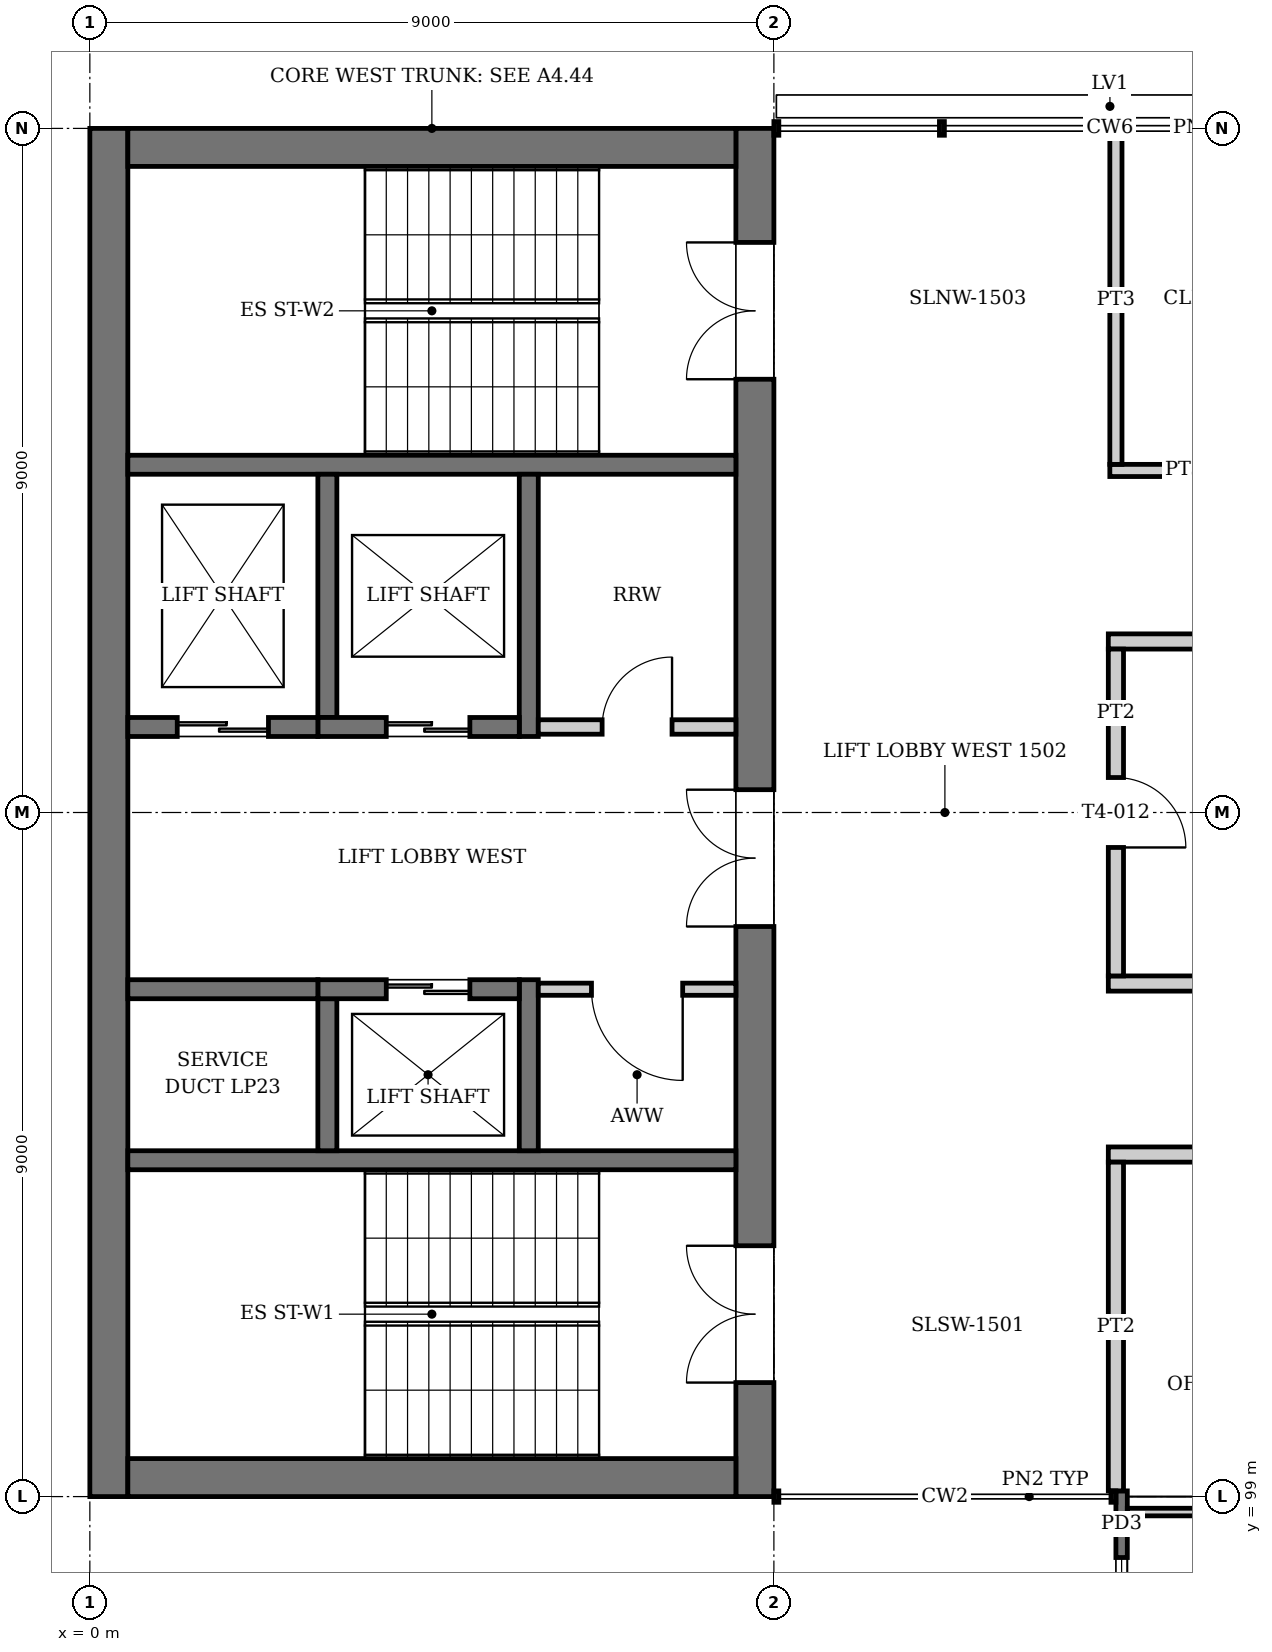
"""IFC4 building model, lengths in metres.
Left out: names, types, materials, properties, quantities, classifications, styles, units other than length and angle.
Written with IfcOpenShell. Run it as: python <this file> out.ifc"""

import sys

from ifc_helpers import new_model, si_unit, direction, frame, frame_2d, origin, place, context, subcontext, project, spatial, rectangle, extrude, element, fill, save


model = new_model("IFC4")
c1 = context("Model", 3, precision=1e-05, world=origin(), true_north=direction((0.0, 1.0)))
c2 = subcontext(c1, "Body", "Model", "MODEL_VIEW")
j1 = project(units=[si_unit("LENGTHUNIT", "METRE"), si_unit("PLANEANGLEUNIT", "RADIAN")], contexts=[c1])
p1 = place(None, origin())
s1 = spatial("IfcSite", under=j1, at=p1, CompositionType="ELEMENT")
p2 = place(p1, origin())
s2 = spatial("IfcBuilding", under=s1, at=p2, CompositionType="ELEMENT")
p3 = place(p2, frame((0.0, 0.0, 63.2)))
s3 = spatial("IfcBuildingStorey", under=s2, at=p3, CompositionType="ELEMENT", Elevation=63.2)
p4 = place(p3, frame((0.25, 99.0, 0.0), z_axis=(0.0, 0.0, 1.0), x_axis=(0.0, 1.0, 0.0)))
e1 = element("IfcWall", 1, at=p4, inside=s3, PredefinedType="SHEAR", context=c2, shape_type="SweptSolid", body=[
    extrude(rectangle(XDim=18.0, YDim=0.5, at=frame_2d((9.0, 0.0))), origin(), (0.0, 0.0, 1.0), 4.0),
])
p5 = place(p3, frame((8.75, 99.0, 0.0), z_axis=(0.0, 0.0, 1.0), x_axis=(0.0, 1.0, 0.0)))
e2 = element("IfcWall", 2, at=p5, inside=s3, PredefinedType="SHEAR", context=c2, shape_type="SweptSolid", body=[
    extrude(rectangle(XDim=18.0, YDim=0.5, at=frame_2d((9.0, 0.0))), origin(), (0.0, 0.0, 1.0), 4.0),
])
p6 = place(p5, frame((1.5, 0.0, 0.0)))
e3 = element("IfcOpeningElement", 3, at=p6, cuts=e2, PredefinedType="OPENING", context=c2, shape_type="SweptSolid", body=[
    extrude(rectangle(XDim=1.8, YDim=2.1, at=frame_2d((0.9, 1.05))), frame((0.0, 0.26, 0.0), z_axis=(0.0, -1.0, 0.0), x_axis=(1.0, 0.0, 0.0)), (0.0, 0.0, 1.0), 0.52),
])
p7 = place(p5, frame((14.7, 0.0, 0.0)))
e4 = element("IfcOpeningElement", 4, at=p7, cuts=e2, PredefinedType="OPENING", context=c2, shape_type="SweptSolid", body=[
    extrude(rectangle(XDim=1.8, YDim=2.1, at=frame_2d((0.9, 1.05))), frame((0.0, 0.26, 0.0), z_axis=(0.0, -1.0, 0.0), x_axis=(1.0, 0.0, 0.0)), (0.0, 0.0, 1.0), 0.52),
])
p8 = place(p5, frame((7.5, 0.0, 0.0)))
e5 = element("IfcOpeningElement", 5, at=p8, cuts=e2, PredefinedType="OPENING", context=c2, shape_type="SweptSolid", body=[
    extrude(rectangle(XDim=1.8, YDim=2.1, at=frame_2d((0.9, 1.05))), frame((0.0, 0.26, 0.0), z_axis=(0.0, -1.0, 0.0), x_axis=(1.0, 0.0, 0.0)), (0.0, 0.0, 1.0), 0.52),
])
for number, where, z_axis, x_axis in (
    (6, (0.5, 99.25, 0.0), (0.0, 0.0, 1.0), (1.0, 0.0, 0.0)),
    (7, (0.5, 116.75, 0.0), (0.0, 0.0, 1.0), (1.0, 0.0, 0.0)),
):
    element("IfcWall", number, at=place(p3, frame(where, z_axis=z_axis, x_axis=x_axis)), inside=s3, PredefinedType="SHEAR", context=c2, shape_type="SweptSolid", body=[
        extrude(rectangle(XDim=8.0, YDim=0.5, at=frame_2d((4.0, 0.0))), origin(), (0.0, 0.0, 1.0), 4.0),
    ])
p9 = place(p3, frame((13.575, 95.55, -0.15), z_axis=(0.0, 0.0, 1.0), x_axis=(0.0, 1.0, 0.0)))
e8 = element("IfcWall", 8, at=p9, inside=s3, PredefinedType="SOLIDWALL", context=c2, shape_type="SweptSolid", body=[
    extrude(rectangle(XDim=3.525, YDim=0.15, at=frame_2d((1.762, 0.0))), origin(), (0.0, 0.0, 1.0), 2.75),
])
p10 = place(p9, frame((0.648, 0.0, 1.05)))
e9 = element("IfcOpeningElement", 9, at=p10, cuts=e8, PredefinedType="OPENING", context=c2, shape_type="SweptSolid", body=[
    extrude(rectangle(XDim=2.0, YDim=1.4, at=frame_2d((1.0, 0.7))), frame((0.0, 0.085, 0.0), z_axis=(0.0, -1.0, 0.0), x_axis=(1.0, 0.0, 0.0)), (0.0, 0.0, 1.0), 0.17),
])
p11 = place(p3, frame((13.65, 98.796, 0.0), z_axis=(0.0, 0.0, 1.0), x_axis=(1.0, 0.0, 0.0)))
e10 = element("IfcWall", 10, at=p11, inside=s3, PredefinedType="PARTITIONING", context=c2, shape_type="SweptSolid", body=[
    extrude(rectangle(XDim=8.7, YDim=0.1, at=frame_2d((4.35, 0.0))), origin(), (0.0, 0.0, 1.0), 2.6),
])
p12 = place(p11, frame((4.6, 0.0, 0.0)))
e11 = element("IfcOpeningElement", 11, at=p12, cuts=e10, PredefinedType="OPENING", context=c2, shape_type="SweptSolid", body=[
    extrude(rectangle(XDim=0.9, YDim=2.1, at=frame_2d((0.45, 1.05))), frame((0.0, 0.06, 0.0), z_axis=(0.0, -1.0, 0.0), x_axis=(1.0, 0.0, 0.0)), (0.0, 0.0, 1.0), 0.12),
])
for number, where, z_axis, x_axis in (
    (12, (8.5, 103.425, 0.0), (0.0, 0.0, 1.0), (-1.0, 0.0, 0.0)),
    (13, (8.5, 112.575, 0.0), (0.0, 0.0, 1.0), (-1.0, 0.0, 0.0)),
):
    element("IfcWall", number, at=place(p3, frame(where, z_axis=z_axis, x_axis=x_axis)), inside=s3, PredefinedType="SOLIDWALL", context=c2, shape_type="SweptSolid", body=[
        extrude(rectangle(XDim=8.0, YDim=0.25, at=frame_2d((4.0, 0.0))), origin(), (0.0, 0.0, 1.0), 3.75),
    ])
p13 = place(p3, frame((5.775, 103.55, 0.0), z_axis=(0.0, 0.0, 1.0), x_axis=(0.0, 1.0, 0.0)))
e14 = element("IfcWall", 14, at=p13, inside=s3, PredefinedType="SOLIDWALL", context=c2, shape_type="SweptSolid", body=[
    extrude(rectangle(XDim=2.25, YDim=0.25, at=frame_2d((1.125, 0.0))), origin(), (0.0, 0.0, 1.0), 4.0),
])
p14 = place(p3, frame((3.125, 103.55, 0.0), z_axis=(0.0, 0.0, 1.0), x_axis=(0.0, 1.0, 0.0)))
e15 = element("IfcWall", 15, at=p14, inside=s3, PredefinedType="SOLIDWALL", context=c2, shape_type="SweptSolid", body=[
    extrude(rectangle(XDim=2.0, YDim=0.25, at=frame_2d((1.0, 0.0))), origin(), (0.0, 0.0, 1.0), 4.0),
])
p15 = place(p3, frame((5.65, 105.675, 0.0), z_axis=(0.0, 0.0, 1.0), x_axis=(-1.0, 0.0, 0.0)))
e16 = element("IfcWall", 16, at=p15, inside=s3, PredefinedType="SOLIDWALL", context=c2, shape_type="SweptSolid", body=[
    extrude(rectangle(XDim=2.65, YDim=0.25, at=frame_2d((1.325, 0.0))), origin(), (0.0, 0.0, 1.0), 4.0),
])
p16 = place(p15, frame((0.65, 0.0, 0.0)))
e17 = element("IfcOpeningElement", 17, at=p16, cuts=e16, PredefinedType="OPENING", context=c2, shape_type="SweptSolid", body=[
    extrude(rectangle(XDim=1.1, YDim=2.1, at=frame_2d((0.55, 1.05))), frame((0.0, 0.135, 0.0), z_axis=(0.0, -1.0, 0.0), x_axis=(1.0, 0.0, 0.0)), (0.0, 0.0, 1.0), 0.27),
])
p17 = place(p3, frame((3.0, 105.675, 0.0), z_axis=(0.0, 0.0, 1.0), x_axis=(-1.0, 0.0, 0.0)))
e18 = element("IfcWall", 18, at=p17, inside=s3, PredefinedType="SOLIDWALL", context=c2, shape_type="SweptSolid", body=[
    extrude(rectangle(XDim=2.5, YDim=0.25, at=frame_2d((1.25, 0.0))), origin(), (0.0, 0.0, 1.0), 4.0),
])
p18 = place(p3, frame((5.775, 109.0, 0.0), z_axis=(0.0, 0.0, 1.0), x_axis=(0.0, 1.0, 0.0)))
e19 = element("IfcWall", 19, at=p18, inside=s3, PredefinedType="SOLIDWALL", context=c2, shape_type="SweptSolid", body=[
    extrude(rectangle(XDim=3.45, YDim=0.25, at=frame_2d((1.725, 0.0))), origin(), (0.0, 0.0, 1.0), 4.0),
])
p19 = place(p3, frame((3.125, 109.25, 0.0), z_axis=(0.0, 0.0, 1.0), x_axis=(0.0, 1.0, 0.0)))
e20 = element("IfcWall", 20, at=p19, inside=s3, PredefinedType="SOLIDWALL", context=c2, shape_type="SweptSolid", body=[
    extrude(rectangle(XDim=3.2, YDim=0.25, at=frame_2d((1.6, 0.0))), origin(), (0.0, 0.0, 1.0), 4.0),
])
p20 = place(p3, frame((5.65, 109.125, 0.0), z_axis=(0.0, 0.0, 1.0), x_axis=(-1.0, 0.0, 0.0)))
e21 = element("IfcWall", 21, at=p20, inside=s3, PredefinedType="SOLIDWALL", context=c2, shape_type="SweptSolid", body=[
    extrude(rectangle(XDim=2.65, YDim=0.25, at=frame_2d((1.325, 0.0))), origin(), (0.0, 0.0, 1.0), 4.0),
])
p21 = place(p20, frame((0.65, 0.0, 0.0)))
e22 = element("IfcOpeningElement", 22, at=p21, cuts=e21, PredefinedType="OPENING", context=c2, shape_type="SweptSolid", body=[
    extrude(rectangle(XDim=1.1, YDim=2.1, at=frame_2d((0.55, 1.05))), frame((0.0, 0.135, 0.0), z_axis=(0.0, -1.0, 0.0), x_axis=(1.0, 0.0, 0.0)), (0.0, 0.0, 1.0), 0.27),
])
p22 = place(p3, frame((3.0, 109.125, 0.0), z_axis=(0.0, 0.0, 1.0), x_axis=(-1.0, 0.0, 0.0)))
e23 = element("IfcWall", 23, at=p22, inside=s3, PredefinedType="SOLIDWALL", context=c2, shape_type="SweptSolid", body=[
    extrude(rectangle(XDim=2.5, YDim=0.25, at=frame_2d((1.25, 0.0))), origin(), (0.0, 0.0, 1.0), 4.0),
])
p23 = place(p22, frame((0.65, 0.0, 0.0)))
e24 = element("IfcOpeningElement", 24, at=p23, cuts=e23, PredefinedType="OPENING", context=c2, shape_type="SweptSolid", body=[
    extrude(rectangle(XDim=1.2, YDim=2.1, at=frame_2d((0.6, 1.05))), frame((0.0, 0.135, 0.0), z_axis=(0.0, -1.0, 0.0), x_axis=(1.0, 0.0, 0.0)), (0.0, 0.0, 1.0), 0.27),
])
p24 = place(p3, frame((8.5, 105.675, 0.0), z_axis=(0.0, 0.0, 1.0), x_axis=(-1.0, 0.0, 0.0)))
e25 = element("IfcWall", 25, at=p24, inside=s3, PredefinedType="PARTITIONING", context=c2, shape_type="SweptSolid", body=[
    extrude(rectangle(XDim=2.6, YDim=0.16, at=frame_2d((1.3, 0.0))), origin(), (0.0, 0.0, 1.0), 3.75),
])
p25 = place(p24, frame((0.7, 0.0, 0.0)))
e26 = element("IfcOpeningElement", 26, at=p25, cuts=e25, PredefinedType="OPENING", context=c2, shape_type="SweptSolid", body=[
    extrude(rectangle(XDim=1.2, YDim=2.1, at=frame_2d((0.6, 1.05))), frame((0.0, 0.09, 0.0), z_axis=(0.0, -1.0, 0.0), x_axis=(1.0, 0.0, 0.0)), (0.0, 0.0, 1.0), 0.18),
])
p26 = place(p3, frame((8.5, 109.125, 0.0), z_axis=(0.0, 0.0, 1.0), x_axis=(-1.0, 0.0, 0.0)))
e27 = element("IfcWall", 27, at=p26, inside=s3, PredefinedType="PARTITIONING", context=c2, shape_type="SweptSolid", body=[
    extrude(rectangle(XDim=2.6, YDim=0.19, at=frame_2d((1.3, 0.0))), origin(), (0.0, 0.0, 1.0), 3.75),
])
p27 = place(p26, frame((0.84, 0.0, 0.0)))
e28 = element("IfcOpeningElement", 28, at=p27, cuts=e27, PredefinedType="OPENING", context=c2, shape_type="SweptSolid", body=[
    extrude(rectangle(XDim=0.92, YDim=2.1, at=frame_2d((0.46, 1.05))), frame((0.0, 0.105, 0.0), z_axis=(0.0, -1.0, 0.0), x_axis=(1.0, 0.0, 0.0)), (0.0, 0.0, 1.0), 0.21),
])
p28 = place(p3, frame((13.4, 103.5, 0.0), z_axis=(0.0, 0.0, 1.0), x_axis=(1.0, 0.0, 0.0)))
e29 = element("IfcWall", 29, at=p28, inside=s3, PredefinedType="PARTITIONING", context=c2, shape_type="SweptSolid", body=[
    extrude(rectangle(XDim=27.2, YDim=0.2, at=frame_2d((13.6, 0.0))), origin(), (0.0, 0.0, 1.0), 3.05),
])
p29 = place(p28, frame((1.85, 0.0, 0.0)))
e30 = element("IfcOpeningElement", 30, at=p29, cuts=e29, PredefinedType="OPENING", context=c2, shape_type="SweptSolid", body=[
    extrude(rectangle(XDim=1.0, YDim=2.1, at=frame_2d((0.5, 1.05))), frame((0.0, 0.11, 0.0), z_axis=(0.0, -1.0, 0.0), x_axis=(1.0, 0.0, 0.0)), (0.0, 0.0, 1.0), 0.22),
])
p30 = place(p28, frame((6.35, 0.0, 0.0)))
e31 = element("IfcOpeningElement", 31, at=p30, cuts=e29, PredefinedType="OPENING", context=c2, shape_type="SweptSolid", body=[
    extrude(rectangle(XDim=1.0, YDim=2.1, at=frame_2d((0.5, 1.05))), frame((0.0, 0.11, 0.0), z_axis=(0.0, -1.0, 0.0), x_axis=(1.0, 0.0, 0.0)), (0.0, 0.0, 1.0), 0.22),
])
p31 = place(p28, frame((10.85, 0.0, 0.0)))
e32 = element("IfcOpeningElement", 32, at=p31, cuts=e29, PredefinedType="OPENING", context=c2, shape_type="SweptSolid", body=[
    extrude(rectangle(XDim=1.0, YDim=2.1, at=frame_2d((0.5, 1.05))), frame((0.0, 0.11, 0.0), z_axis=(0.0, -1.0, 0.0), x_axis=(1.0, 0.0, 0.0)), (0.0, 0.0, 1.0), 0.22),
])
p32 = place(p28, frame((15.35, 0.0, 0.0)))
e33 = element("IfcOpeningElement", 33, at=p32, cuts=e29, PredefinedType="OPENING", context=c2, shape_type="SweptSolid", body=[
    extrude(rectangle(XDim=1.0, YDim=2.1, at=frame_2d((0.5, 1.05))), frame((0.0, 0.11, 0.0), z_axis=(0.0, -1.0, 0.0), x_axis=(1.0, 0.0, 0.0)), (0.0, 0.0, 1.0), 0.22),
])
p33 = place(p28, frame((19.85, 0.0, 0.0)))
e34 = element("IfcOpeningElement", 34, at=p33, cuts=e29, PredefinedType="OPENING", context=c2, shape_type="SweptSolid", body=[
    extrude(rectangle(XDim=1.0, YDim=2.1, at=frame_2d((0.5, 1.05))), frame((0.0, 0.11, 0.0), z_axis=(0.0, -1.0, 0.0), x_axis=(1.0, 0.0, 0.0)), (0.0, 0.0, 1.0), 0.22),
])
p34 = place(p28, frame((24.45, 0.0, 0.0)))
e35 = element("IfcOpeningElement", 35, at=p34, cuts=e29, PredefinedType="OPENING", context=c2, shape_type="SweptSolid", body=[
    extrude(rectangle(XDim=0.8, YDim=2.1, at=frame_2d((0.4, 1.05))), frame((0.0, 0.11, 0.0), z_axis=(0.0, -1.0, 0.0), x_axis=(1.0, 0.0, 0.0)), (0.0, 0.0, 1.0), 0.22),
])
p35 = place(p3, frame((13.4, 105.75, 0.0), z_axis=(0.0, 0.0, 1.0), x_axis=(1.0, 0.0, 0.0)))
e36 = element("IfcWall", 36, at=p35, inside=s3, PredefinedType="PARTITIONING", context=c2, shape_type="SweptSolid", body=[
    extrude(rectangle(XDim=27.2, YDim=0.2, at=frame_2d((13.6, 0.0))), origin(), (0.0, 0.0, 1.0), 3.05),
])
p36 = place(p35, frame((12.9, 0.0, 0.0)))
e37 = element("IfcOpeningElement", 37, at=p36, cuts=e36, PredefinedType="OPENING", context=c2, shape_type="SweptSolid", body=[
    extrude(rectangle(XDim=1.4, YDim=2.1, at=frame_2d((0.7, 1.05))), frame((0.0, 0.11, 0.0), z_axis=(0.0, -1.0, 0.0), x_axis=(1.0, 0.0, 0.0)), (0.0, 0.0, 1.0), 0.22),
])
p37 = place(p3, frame((13.4, 110.25, 0.0), z_axis=(0.0, 0.0, 1.0), x_axis=(1.0, 0.0, 0.0)))
e38 = element("IfcWall", 38, at=p37, inside=s3, PredefinedType="PARTITIONING", context=c2, shape_type="SweptSolid", body=[
    extrude(rectangle(XDim=27.2, YDim=0.2, at=frame_2d((13.6, 0.0))), origin(), (0.0, 0.0, 1.0), 3.05),
])
p38 = place(p37, frame((12.9, 0.0, 0.0)))
e39 = element("IfcOpeningElement", 39, at=p38, cuts=e38, PredefinedType="OPENING", context=c2, shape_type="SweptSolid", body=[
    extrude(rectangle(XDim=1.4, YDim=2.1, at=frame_2d((0.7, 1.05))), frame((0.0, 0.11, 0.0), z_axis=(0.0, -1.0, 0.0), x_axis=(1.0, 0.0, 0.0)), (0.0, 0.0, 1.0), 0.22),
])
p39 = place(p3, frame((13.42, 112.5, 0.0), z_axis=(0.0, 0.0, 1.0), x_axis=(1.0, 0.0, 0.0)))
e40 = element("IfcWall", 40, at=p39, inside=s3, PredefinedType="PARTITIONING", context=c2, shape_type="SweptSolid", body=[
    extrude(rectangle(XDim=4.66, YDim=0.16, at=frame_2d((2.33, 0.0))), origin(), (0.0, 0.0, 1.0), 3.05),
])
p40 = place(p39, frame((1.955, 0.0, 0.0)))
e41 = element("IfcOpeningElement", 41, at=p40, cuts=e40, PredefinedType="OPENING", context=c2, shape_type="SweptSolid", body=[
    extrude(rectangle(XDim=0.75, YDim=2.1, at=frame_2d((0.375, 1.05))), frame((0.0, 0.09, 0.0), z_axis=(0.0, -1.0, 0.0), x_axis=(1.0, 0.0, 0.0)), (0.0, 0.0, 1.0), 0.18),
])
p41 = place(p3, frame((13.5, 99.075, 0.0), z_axis=(0.0, 0.0, 1.0), x_axis=(0.0, 1.0, 0.0)))
e42 = element("IfcWall", 42, at=p41, inside=s3, PredefinedType="PARTITIONING", context=c2, shape_type="SweptSolid", body=[
    extrude(rectangle(XDim=4.325, YDim=0.2, at=frame_2d((2.163, 0.0))), origin(), (0.0, 0.0, 1.0), 3.05),
])
p42 = place(p3, frame((13.5, 105.85, 0.0), z_axis=(0.0, 0.0, 1.0), x_axis=(0.0, 1.0, 0.0)))
e43 = element("IfcWall", 43, at=p42, inside=s3, PredefinedType="PARTITIONING", context=c2, shape_type="SweptSolid", body=[
    extrude(rectangle(XDim=4.3, YDim=0.2, at=frame_2d((2.15, 0.0))), origin(), (0.0, 0.0, 1.0), 3.05),
])
p43 = place(p42, frame((1.69, 0.0, 0.0)))
e44 = element("IfcOpeningElement", 44, at=p43, cuts=e43, PredefinedType="OPENING", context=c2, shape_type="SweptSolid", body=[
    extrude(rectangle(XDim=0.92, YDim=2.1, at=frame_2d((0.46, 1.05))), frame((0.0, 0.11, 0.0), z_axis=(0.0, -1.0, 0.0), x_axis=(1.0, 0.0, 0.0)), (0.0, 0.0, 1.0), 0.22),
])
p44 = place(p3, frame((13.5, 112.58, 0.0), z_axis=(0.0, 0.0, 1.0), x_axis=(0.0, 1.0, 0.0)))
e45 = element("IfcWall", 45, at=p44, inside=s3, PredefinedType="PARTITIONING", context=c2, shape_type="SweptSolid", body=[
    extrude(rectangle(XDim=4.33, YDim=0.16, at=frame_2d((2.165, 0.0))), origin(), (0.0, 0.0, 1.0), 3.05),
])
p45 = place(p10, origin())
e46 = element("IfcWindow", 46, at=p45, inside=s3, PartitioningType="SINGLE_PANEL", PredefinedType="WINDOW", context=c2, shape_type="SweptSolid", body=[
    extrude(rectangle(XDim=2.0, YDim=1.4, at=frame_2d((1.0, 0.7))), frame((0.0, 0.03, 0.0), z_axis=(0.0, -1.0, 0.0), x_axis=(1.0, 0.0, 0.0)), (0.0, 0.0, 1.0), 0.06),
])
fill(e9, e46)
p46 = place(p16, origin())
e47 = element("IfcDoor", 47, at=p46, inside=s3, OperationType="DOUBLE_DOOR_SLIDING", PredefinedType="DOOR", context=c2, shape_type="SweptSolid", body=[
    extrude(rectangle(XDim=1.1, YDim=2.1, at=frame_2d((0.55, 1.05))), frame((0.0, 0.025, 0.0), z_axis=(0.0, -1.0, 0.0), x_axis=(1.0, 0.0, 0.0)), (0.0, 0.0, 1.0), 0.05),
])
fill(e17, e47)
p47 = place(p21, origin())
e48 = element("IfcDoor", 48, at=p47, inside=s3, OperationType="DOUBLE_DOOR_SLIDING", PredefinedType="DOOR", context=c2, shape_type="SweptSolid", body=[
    extrude(rectangle(XDim=1.1, YDim=2.1, at=frame_2d((0.55, 1.05))), frame((0.0, 0.025, 0.0), z_axis=(0.0, -1.0, 0.0), x_axis=(1.0, 0.0, 0.0)), (0.0, 0.0, 1.0), 0.05),
])
fill(e22, e48)
p48 = place(p23, origin())
e49 = element("IfcDoor", 49, at=p48, inside=s3, OperationType="DOUBLE_DOOR_SLIDING", PredefinedType="DOOR", context=c2, shape_type="SweptSolid", body=[
    extrude(rectangle(XDim=1.2, YDim=2.1, at=frame_2d((0.6, 1.05))), frame((0.0, 0.025, 0.0), z_axis=(0.0, -1.0, 0.0), x_axis=(1.0, 0.0, 0.0)), (0.0, 0.0, 1.0), 0.05),
])
fill(e24, e49)
p49 = place(p43, frame((0.92, 0.0, 0.0), z_axis=(0.0, 0.0, 1.0), x_axis=(-1.0, 0.0, 0.0)))
e50 = element("IfcDoor", 50, at=p49, inside=s3, OperationType="SINGLE_SWING_RIGHT", PredefinedType="DOOR", context=c2, shape_type="SweptSolid", body=[
    extrude(rectangle(XDim=0.92, YDim=2.1, at=frame_2d((0.46, 1.05))), frame((0.0, 0.025, 0.0), z_axis=(0.0, -1.0, 0.0), x_axis=(1.0, 0.0, 0.0)), (0.0, 0.0, 1.0), 0.05),
])
fill(e44, e50)
p50 = place(p6, origin())
e51 = element("IfcDoor", 51, at=p50, inside=s3, OperationType="DOUBLE_DOOR_SINGLE_SWING", PredefinedType="DOOR", context=c2, shape_type="SweptSolid", body=[
    extrude(rectangle(XDim=1.8, YDim=2.1, at=frame_2d((0.9, 1.05))), frame((0.0, 0.025, 0.0), z_axis=(0.0, -1.0, 0.0), x_axis=(1.0, 0.0, 0.0)), (0.0, 0.0, 1.0), 0.05),
])
fill(e3, e51)
p51 = place(p7, origin())
e52 = element("IfcDoor", 52, at=p51, inside=s3, OperationType="DOUBLE_DOOR_SINGLE_SWING", PredefinedType="DOOR", context=c2, shape_type="SweptSolid", body=[
    extrude(rectangle(XDim=1.8, YDim=2.1, at=frame_2d((0.9, 1.05))), frame((0.0, 0.025, 0.0), z_axis=(0.0, -1.0, 0.0), x_axis=(1.0, 0.0, 0.0)), (0.0, 0.0, 1.0), 0.05),
])
fill(e4, e52)
p52 = place(p8, origin())
e53 = element("IfcDoor", 53, at=p52, inside=s3, OperationType="DOUBLE_DOOR_SINGLE_SWING", PredefinedType="DOOR", context=c2, shape_type="SweptSolid", body=[
    extrude(rectangle(XDim=1.8, YDim=2.1, at=frame_2d((0.9, 1.05))), frame((0.0, 0.025, 0.0), z_axis=(0.0, -1.0, 0.0), x_axis=(1.0, 0.0, 0.0)), (0.0, 0.0, 1.0), 0.05),
])
fill(e5, e53)
p53 = place(p25, origin())
e54 = element("IfcDoor", 54, at=p53, inside=s3, OperationType="SINGLE_SWING_LEFT", PredefinedType="DOOR", context=c2, shape_type="SweptSolid", body=[
    extrude(rectangle(XDim=1.2, YDim=2.1, at=frame_2d((0.6, 1.05))), frame((0.0, 0.025, 0.0), z_axis=(0.0, -1.0, 0.0), x_axis=(1.0, 0.0, 0.0)), (0.0, 0.0, 1.0), 0.05),
])
fill(e26, e54)
p54 = place(p27, frame((0.92, 0.0, 0.0), z_axis=(0.0, 0.0, 1.0), x_axis=(-1.0, 0.0, 0.0)))
e55 = element("IfcDoor", 55, at=p54, inside=s3, OperationType="SINGLE_SWING_RIGHT", PredefinedType="DOOR", context=c2, shape_type="SweptSolid", body=[
    extrude(rectangle(XDim=0.92, YDim=2.1, at=frame_2d((0.46, 1.05))), frame((0.0, 0.025, 0.0), z_axis=(0.0, -1.0, 0.0), x_axis=(1.0, 0.0, 0.0)), (0.0, 0.0, 1.0), 0.05),
])
fill(e28, e55)
save(model, sys.argv[1])
